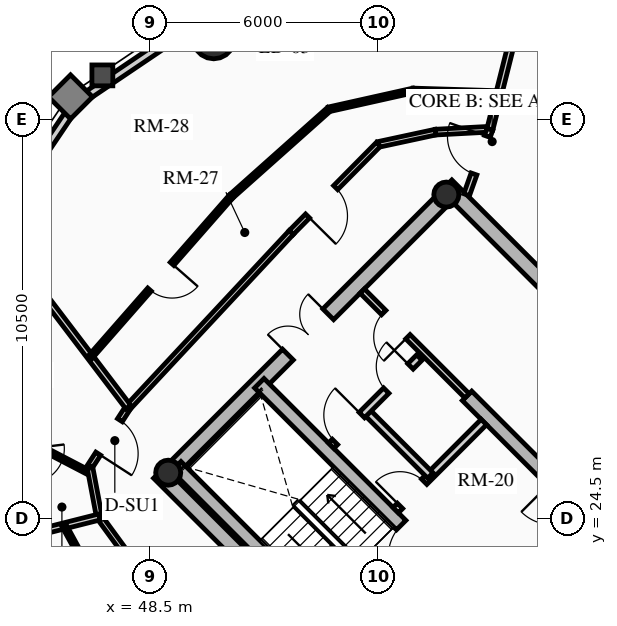
"""IFC4 building model, lengths in metres.
Left out: names, types, materials, properties, quantities, classifications, styles, units other than length and angle.
Written with IfcOpenShell. Run it as: python <this file> out.ifc"""

import sys

from ifc_helpers import new_model, si_unit, direction, frame, frame_2d, origin, origin_2d, place, context, subcontext, project, spatial, rectangle, circle, hollow_circle, extrude, source, transform, mapped, element, fill, save


model = new_model("IFC4")
c1 = context("Model", 3, precision=1e-05, world=origin(), true_north=direction((0.0, 1.0)))
c2 = subcontext(c1, "Body", "Model", "MODEL_VIEW")
j1 = project(units=[si_unit("LENGTHUNIT", "METRE"), si_unit("PLANEANGLEUNIT", "RADIAN")], contexts=[c1])
p1 = place(None, origin())
s1 = spatial("IfcSite", under=j1, at=p1, CompositionType="ELEMENT")
p2 = place(p1, origin())
s2 = spatial("IfcBuilding", under=s1, at=p2, CompositionType="ELEMENT")
p3 = place(p2, frame((0.0, 0.0, 214.12)))
s3 = spatial("IfcBuildingStorey", under=s2, at=p3, CompositionType="ELEMENT", Elevation=214.12)
for number, where, z_axis, x_axis in (
    (1, (58.702, 15.732, 0.0), (0.0, 0.0, 1.0), (-0.707, 0.707, 0.0)),
    (2, (66.268, 23.298, 0.0), (0.0, 0.0, 1.0), (-0.707, 0.707, 0.0)),
):
    element("IfcWall", number, at=place(p3, frame(where, z_axis=z_axis, x_axis=x_axis)), inside=s3, PredefinedType="SHEAR", context=c2, shape_type="SweptSolid", body=[
        extrude(rectangle(XDim=14.1, YDim=0.4, at=frame_2d((7.05, 0.0))), origin(), (0.0, 0.0, 1.0), 2.91),
    ])
p4 = place(p3, frame((48.873, 25.561, 0.0), z_axis=(0.0, 0.0, 1.0), x_axis=(0.707106781187, 0.707106781187, 0.0)))
e3 = element("IfcWall", 3, at=p4, inside=s3, PredefinedType="SHEAR", context=c2, shape_type="SweptSolid", body=[
    extrude(rectangle(XDim=10.7, YDim=0.4, at=frame_2d((5.35, 0.0))), origin(), (0.0, 0.0, 1.0), 2.91),
])
m1 = source(origin(), c2, "Body", "SweptSolid", [
    extrude(rectangle(XDim=1.5, YDim=2.02, at=frame_2d((0.75, 1.01))), frame((0.0, 0.21, 0.0), z_axis=(0.0, -1.0, 0.0), x_axis=(1.0, 0.0, 0.0)), (0.0, 0.0, 1.0), 0.42),
])
p5 = place(p4, frame((4.6, 0.0, 0.0)))
e4 = element("IfcOpeningElement", 4, at=p5, cuts=e3, PredefinedType="OPENING", context=c2, shape_type="MappedRepresentation", body=[
    mapped(m1, transform((0.0, 0.0, 0.0), x_axis=(1.0, 0.0, 0.0), y_axis=(0.0, 1.0, 0.0), z_axis=(0.0, 0.0, 1.0), scale=1.0)),
])
p6 = place(p3, frame((61.06, 18.373, 0.0), z_axis=(0.0, 0.0, 1.0), x_axis=(-0.707106781187, 0.707106781187, 0.0)))
e5 = element("IfcWall", 5, at=p6, inside=s3, PredefinedType="SHEAR", context=c2, shape_type="SweptSolid", body=[
    extrude(rectangle(XDim=13.7, YDim=0.35, at=frame_2d((6.85, 0.0))), origin(), (0.0, 0.0, 1.0), 2.91),
])
m2 = source(origin(), c2, "Body", "SweptSolid", [
    extrude(rectangle(XDim=1.1, YDim=2.015, at=frame_2d((0.55, 1.007))), frame((0.0, 0.185, 0.0), z_axis=(0.0, -1.0, 0.0), x_axis=(1.0, 0.0, 0.0)), (0.0, 0.0, 1.0), 0.37),
])
p7 = place(p6, frame((4.85, 0.0, 0.0)))
e6 = element("IfcOpeningElement", 6, at=p7, cuts=e5, PredefinedType="OPENING", context=c2, shape_type="MappedRepresentation", body=[
    mapped(m2, transform((0.0, 0.0, 0.0), x_axis=(1.0, 0.0, 0.0), y_axis=(0.0, 1.0, 0.0), z_axis=(0.0, 0.0, 1.0), scale=1.0)),
])
p8 = place(p6, frame((0.625, 0.0, 0.0)))
e7 = element("IfcOpeningElement", 7, at=p8, cuts=e5, PredefinedType="OPENING", context=c2, shape_type="MappedRepresentation", body=[
    mapped(m2, transform((0.0, 0.0, 0.0), x_axis=(1.0, 0.0, 0.0), y_axis=(0.0, 1.0, 0.0), z_axis=(0.0, 0.0, 1.0), scale=1.0)),
])
p9 = place(p6, frame((2.625, 0.0, 0.0)))
e8 = element("IfcOpeningElement", 8, at=p9, cuts=e5, PredefinedType="OPENING", context=c2, shape_type="MappedRepresentation", body=[
    mapped(m2, transform((0.0, 0.0, 0.0), x_axis=(1.0, 0.0, 0.0), y_axis=(0.0, 1.0, 0.0), z_axis=(0.0, 0.0, 1.0), scale=1.0)),
])
m3 = source(origin(), c2, "Body", "SweptSolid", [
    extrude(rectangle(XDim=1.15, YDim=2.02, at=frame_2d((0.575, 1.01))), frame((0.0, 0.185, 0.0), z_axis=(0.0, -1.0, 0.0), x_axis=(1.0, 0.0, 0.0)), (0.0, 0.0, 1.0), 0.37),
])
p10 = place(p6, frame((7.27, 0.0, 0.0)))
e9 = element("IfcOpeningElement", 9, at=p10, cuts=e5, PredefinedType="OPENING", context=c2, shape_type="MappedRepresentation", body=[
    mapped(m3, transform((0.0, 0.0, 0.0), x_axis=(1.0, 0.0, 0.0), y_axis=(0.0, 1.0, 0.0), z_axis=(0.0, 0.0, 1.0), scale=1.0)),
])
p11 = place(p3, frame((63.627, 20.94, 0.0), z_axis=(0.0, 0.0, 1.0), x_axis=(-0.707119496762, 0.707094065383, 0.0)))
e10 = element("IfcWall", 10, at=p11, inside=s3, PredefinedType="SHEAR", context=c2, shape_type="SweptSolid", body=[
    extrude(rectangle(XDim=9.6, YDim=0.35, at=frame_2d((4.8, 0.0))), origin(), (0.0, 0.0, 1.0), 2.91),
])
p12 = place(p11, frame((5.28, 0.0, 0.0)))
e11 = element("IfcOpeningElement", 11, at=p12, cuts=e10, PredefinedType="OPENING", context=c2, shape_type="MappedRepresentation", body=[
    mapped(m3, transform((0.0, 0.0, 0.0), x_axis=(1.0, 0.0, 0.0), y_axis=(0.0, 1.0, 0.0), z_axis=(0.0, 0.0, 1.0), scale=1.0)),
])
p13 = place(p3, frame((53.922, 21.141, 0.0), z_axis=(0.0, 0.0, 1.0), x_axis=(-0.707106781187, 0.707106781187, 0.0)))
e12 = element("IfcWall", 12, at=p13, inside=s3, PredefinedType="SHEAR", context=c2, shape_type="SweptSolid", body=[
    extrude(rectangle(XDim=6.695, YDim=0.35, at=frame_2d((3.348, 0.0))), origin(), (0.0, 0.0, 1.0), 2.91),
])
for number, where, z_axis, x_axis in (
    (13, (48.976, 25.706, 0.0), (0.0, 0.0, 1.0), (0.707, 0.707, 0.0)),
    (14, (56.294, 33.024, 0.0), (0.0, 0.0, 1.0), (0.707, 0.707, 0.0)),
):
    element("IfcColumn", number, at=place(p3, frame(where, z_axis=z_axis, x_axis=x_axis)), inside=s3, PredefinedType="COLUMN", context=c2, shape_type="SweptSolid", body=[
        extrude(hollow_circle(Radius=0.33, WallThickness=0.025, at=origin_2d()), origin(), (0.0, 0.0, 1.0), 2.91),
    ])
p14 = place(p3, frame((50.173, 37.146, 0.0), z_axis=(0.0, 0.0, 1.0), x_axis=(1.0, 0.0, 0.0)))
e15 = element("IfcColumn", 15, at=p14, inside=s3, PredefinedType="USERDEFINED", context=c2, shape_type="SweptSolid", body=[
    extrude(circle(Radius=0.55, at=origin_2d()), origin(), (0.0, 0.0, 1.0), 2.91),
])
p15 = place(p3, frame((46.561, 35.439, 0.0), z_axis=(0.0, 0.0, 1.0), x_axis=(0.828833723692, 0.559495003079, 0.0)))
e16 = element("IfcWall", 16, at=p15, inside=s3, PredefinedType="SOLIDWALL", context=c2, shape_type="SweptSolid", body=[
    extrude(rectangle(XDim=3.976, YDim=0.22, at=frame_2d((1.988, 0.0))), origin(), (0.0, 0.0, 1.0), 2.322),
])
p16 = place(p3, frame((44.337, 32.144, 0.0), z_axis=(0.0, 0.0, 1.0), x_axis=(0.559495003079, 0.828833723692, 0.0)))
e17 = element("IfcWall", 17, at=p16, inside=s3, PredefinedType="SOLIDWALL", context=c2, shape_type="SweptSolid", body=[
    extrude(rectangle(XDim=3.976, YDim=0.22, at=frame_2d((1.988, 0.0))), origin(), (0.0, 0.0, 1.0), 2.322),
])
m4 = source(origin(), c2, "Body", "SweptSolid", [
    extrude(rectangle(XDim=1.05, YDim=1.3, at=frame_2d((0.525, 0.65))), frame((0.0, 0.12, 0.0), z_axis=(0.0, -1.0, 0.0), x_axis=(1.0, 0.0, 0.0)), (0.0, 0.0, 1.0), 0.24),
])
p17 = place(p16, frame((1.463, 0.0, 0.65)))
e18 = element("IfcOpeningElement", 18, at=p17, cuts=e17, PredefinedType="OPENING", context=c2, shape_type="MappedRepresentation", body=[
    mapped(m4, transform((0.0, 0.0, 0.0), x_axis=(1.0, 0.0, 0.0), y_axis=(0.0, 1.0, 0.0), z_axis=(0.0, 0.0, 1.0), scale=1.0)),
])
p18 = place(p3, frame((58.214, 21.467, 0.0), z_axis=(0.0, 0.0, 1.0), x_axis=(0.707106781187, 0.707106781187, 0.0)))
e19 = element("IfcWall", 19, at=p18, inside=s3, PredefinedType="PARTITIONING", context=c2, shape_type="SweptSolid", body=[
    extrude(rectangle(XDim=3.28, YDim=0.2, at=frame_2d((1.64, 0.0))), origin(), (0.0, 0.0, 1.0), 2.685),
])
m5 = source(origin(), c2, "Body", "SweptSolid", [
    extrude(rectangle(XDim=1.5, YDim=2.02, at=frame_2d((0.75, 1.01))), frame((0.0, 0.11, 0.0), z_axis=(0.0, -1.0, 0.0), x_axis=(1.0, 0.0, 0.0)), (0.0, 0.0, 1.0), 0.22),
])
p19 = place(p18, frame((1.55, 0.0, 0.0)))
e20 = element("IfcOpeningElement", 20, at=p19, cuts=e19, PredefinedType="OPENING", context=c2, shape_type="MappedRepresentation", body=[
    mapped(m5, transform((0.0, 0.0, 0.0), x_axis=(1.0, 0.0, 0.0), y_axis=(0.0, 1.0, 0.0), z_axis=(0.0, 0.0, 1.0), scale=1.0)),
])
p20 = place(p3, frame((54.961, 24.719, 0.0), z_axis=(0.0, 0.0, 1.0), x_axis=(0.707106781187, 0.707106781187, 0.0)))
e21 = element("IfcWall", 21, at=p20, inside=s3, PredefinedType="PARTITIONING", context=c2, shape_type="SweptSolid", body=[
    extrude(rectangle(XDim=3.28, YDim=0.2, at=frame_2d((1.64, 0.0))), origin(), (0.0, 0.0, 1.0), 2.685),
])
m6 = source(origin(), c2, "Body", "SweptSolid", [
    extrude(rectangle(XDim=0.9, YDim=2.005, at=frame_2d((0.45, 1.002))), frame((0.0, 0.11, 0.0), z_axis=(0.0, -1.0, 0.0), x_axis=(1.0, 0.0, 0.0)), (0.0, 0.0, 1.0), 0.22),
])
p21 = place(p20, frame((0.16, 0.0, 0.0)))
e22 = element("IfcOpeningElement", 22, at=p21, cuts=e21, PredefinedType="OPENING", context=c2, shape_type="MappedRepresentation", body=[
    mapped(m6, transform((0.0, 0.0, 0.0), x_axis=(1.0, 0.0, 0.0), y_axis=(0.0, 1.0, 0.0), z_axis=(0.0, 0.0, 1.0), scale=1.0)),
])
p22 = place(p3, frame((55.874, 25.631, 0.0), z_axis=(0.0, 0.0, 1.0), x_axis=(-0.707157639372, 0.707055919343, 0.0)))
e23 = element("IfcWall", 23, at=p22, inside=s3, PredefinedType="PARTITIONING", context=c2, shape_type="SweptSolid", body=[
    extrude(rectangle(XDim=2.4, YDim=0.2, at=frame_2d((1.2, 0.0))), origin(), (0.0, 0.0, 1.0), 2.685),
])
p23 = place(p3, frame((53.264, 26.416, 0.0), z_axis=(0.0, 0.0, 1.0), x_axis=(0.707106781187, 0.707106781187, 0.0)))
e24 = element("IfcWall", 24, at=p23, inside=s3, PredefinedType="PARTITIONING", context=c2, shape_type="SweptSolid", body=[
    extrude(rectangle(XDim=3.28, YDim=0.2, at=frame_2d((1.64, 0.0))), origin(), (0.0, 0.0, 1.0), 2.685),
])
m7 = source(origin(), c2, "Body", "SweptSolid", [
    extrude(rectangle(XDim=1.0, YDim=2.015, at=frame_2d((0.5, 1.007))), frame((0.0, 0.11, 0.0), z_axis=(0.0, -1.0, 0.0), x_axis=(1.0, 0.0, 0.0)), (0.0, 0.0, 1.0), 0.22),
])
p24 = place(p23, frame((0.14, 0.0, 0.0)))
e25 = element("IfcOpeningElement", 25, at=p24, cuts=e24, PredefinedType="OPENING", context=c2, shape_type="MappedRepresentation", body=[
    mapped(m7, transform((0.0, 0.0, 0.0), x_axis=(1.0, 0.0, 0.0), y_axis=(0.0, 1.0, 0.0), z_axis=(0.0, 0.0, 1.0), scale=1.0)),
])
p25 = place(p23, frame((2.05, 0.0, 0.0)))
e26 = element("IfcOpeningElement", 26, at=p25, cuts=e24, PredefinedType="OPENING", context=c2, shape_type="MappedRepresentation", body=[
    mapped(m6, transform((0.0, 0.0, 0.0), x_axis=(1.0, 0.0, 0.0), y_axis=(0.0, 1.0, 0.0), z_axis=(0.0, 0.0, 1.0), scale=1.0)),
])
p26 = place(p3, frame((56.839, 27.728, 0.0), z_axis=(0.0, 0.0, 1.0), x_axis=(-0.707106781187, 0.707106781187, 0.0)))
e27 = element("IfcWall", 27, at=p26, inside=s3, PredefinedType="PARTITIONING", context=c2, shape_type="SweptSolid", body=[
    extrude(rectangle(XDim=3.9, YDim=0.16, at=frame_2d((1.95, 0.0))), origin(), (0.0, 0.0, 1.0), 2.685),
])
m8 = source(origin(), c2, "Body", "SweptSolid", [
    extrude(rectangle(XDim=0.9, YDim=2.005, at=frame_2d((0.45, 1.002))), frame((0.0, 0.09, 0.0), z_axis=(0.0, -1.0, 0.0), x_axis=(1.0, 0.0, 0.0)), (0.0, 0.0, 1.0), 0.18),
])
p27 = place(p26, frame((2.2, 0.0, 0.0)))
e28 = element("IfcOpeningElement", 28, at=p27, cuts=e27, PredefinedType="OPENING", context=c2, shape_type="MappedRepresentation", body=[
    mapped(m8, transform((0.0, 0.0, 0.0), x_axis=(1.0, 0.0, 0.0), y_axis=(0.0, 1.0, 0.0), z_axis=(0.0, 0.0, 1.0), scale=1.0)),
])
p28 = place(p3, frame((57.44, 34.744, 0.0), z_axis=(0.0, 0.0, 1.0), x_axis=(-0.998578025565, -0.053309725738, 0.0)))
e29 = element("IfcWall", 29, at=p28, inside=s3, PredefinedType="PARTITIONING", context=c2, shape_type="SweptSolid", body=[
    extrude(rectangle(XDim=1.433, YDim=0.15, at=frame_2d((0.717, 0.0))), origin(), (0.0, 0.0, 1.0), 2.322),
])
p29 = place(p3, frame((56.009, 34.667, 0.0), z_axis=(0.0, 0.0, 1.0), x_axis=(-0.977625498152, -0.210353001795, 0.0)))
e30 = element("IfcWall", 30, at=p29, inside=s3, PredefinedType="PARTITIONING", context=c2, shape_type="SweptSolid", body=[
    extrude(rectangle(XDim=1.538, YDim=0.15, at=frame_2d((0.769, 0.0))), origin(), (0.0, 0.0, 1.0), 2.255),
])
p30 = place(p3, frame((54.506, 34.344, 0.0), z_axis=(0.0, 0.0, 1.0), x_axis=(-0.703053402247, -0.711137056824, 0.0)))
e31 = element("IfcWall", 31, at=p30, inside=s3, PredefinedType="PARTITIONING", context=c2, shape_type="SweptSolid", body=[
    extrude(rectangle(XDim=3.262, YDim=0.15, at=frame_2d((1.631, 0.0))), origin(), (0.0, 0.0, 1.0), 2.322),
])
m9 = source(origin(), c2, "Body", "SweptSolid", [
    extrude(rectangle(XDim=1.05, YDim=2.015, at=frame_2d((0.525, 1.007))), frame((0.0, 0.085, 0.0), z_axis=(0.0, -1.0, 0.0), x_axis=(1.0, 0.0, 0.0)), (0.0, 0.0, 1.0), 0.17),
])
p31 = place(p30, frame((1.599, 0.0, 0.0)))
e32 = element("IfcOpeningElement", 32, at=p31, cuts=e31, PredefinedType="OPENING", context=c2, shape_type="MappedRepresentation", body=[
    mapped(m9, transform((0.0, 0.0, 0.0), x_axis=(1.0, 0.0, 0.0), y_axis=(0.0, 1.0, 0.0), z_axis=(0.0, 0.0, 1.0), scale=1.0)),
])
p32 = place(p3, frame((52.212, 32.024, 0.0), z_axis=(0.0, 0.0, 1.0), x_axis=(-0.682158998173, -0.731203871169, 0.0)))
e33 = element("IfcWall", 33, at=p32, inside=s3, PredefinedType="PARTITIONING", context=c2, shape_type="SweptSolid", body=[
    extrude(rectangle(XDim=6.282, YDim=0.15, at=frame_2d((3.141, 0.0))), origin(), (0.0, 0.0, 1.0), 2.255),
])
p33 = place(p3, frame((47.927, 27.431, 0.0), z_axis=(0.0, 0.0, 1.0), x_axis=(-0.543126643356, -0.839650790077, 0.0)))
e34 = element("IfcWall", 34, at=p33, inside=s3, PredefinedType="PARTITIONING", context=c2, shape_type="SweptSolid", body=[
    extrude(rectangle(XDim=1.868, YDim=0.15, at=frame_2d((0.934, 0.0))), origin(), (0.0, 0.0, 1.0), 2.255),
])
p34 = place(p33, frame((0.409, 0.0, 0.0)))
e35 = element("IfcOpeningElement", 35, at=p34, cuts=e34, PredefinedType="OPENING", context=c2, shape_type="MappedRepresentation", body=[
    mapped(m9, transform((0.0, 0.0, 0.0), x_axis=(1.0, 0.0, 0.0), y_axis=(0.0, 1.0, 0.0), z_axis=(0.0, 0.0, 1.0), scale=1.0)),
])
p35 = place(p3, frame((46.912, 25.862, 0.0), z_axis=(0.0, 0.0, 1.0), x_axis=(0.186095172215, -0.98253172309, 0.0)))
e36 = element("IfcWall", 36, at=p35, inside=s3, PredefinedType="PARTITIONING", context=c2, shape_type="SweptSolid", body=[
    extrude(rectangle(XDim=1.346, YDim=0.15, at=frame_2d((0.673, 0.0))), origin(), (0.0, 0.0, 1.0), 2.322),
])
p36 = place(p3, frame((47.163, 24.54, 0.0), z_axis=(0.0, 0.0, 1.0), x_axis=(0.589711902124, -0.807613690135, 0.0)))
e37 = element("IfcWall", 37, at=p36, inside=s3, PredefinedType="PARTITIONING", context=c2, shape_type="SweptSolid", body=[
    extrude(rectangle(XDim=1.507, YDim=0.15, at=frame_2d((0.753, 0.0))), origin(), (0.0, 0.0, 1.0), 2.255),
])
p37 = place(p3, frame((57.44, 34.744, 0.0), z_axis=(0.0, 0.0, 1.0), x_axis=(0.243619816457, 0.969870808422, 0.0)))
e38 = element("IfcWall", 38, at=p37, inside=s3, PredefinedType="PARTITIONING", context=c2, shape_type="SweptSolid", body=[
    extrude(rectangle(XDim=3.496, YDim=0.16, at=frame_2d((1.748, 0.0))), origin(), (0.0, 0.0, 1.0), 2.322),
])
p38 = place(p3, frame((47.927, 27.431, 0.0), z_axis=(0.0, 0.0, 1.0), x_axis=(-0.604823333103, 0.796359677366, 0.0)))
e39 = element("IfcWall", 39, at=p38, inside=s3, PredefinedType="PARTITIONING", context=c2, shape_type="SweptSolid", body=[
    extrude(rectangle(XDim=5.907, YDim=0.16, at=frame_2d((2.953, 0.0))), origin(), (0.0, 0.0, 1.0), 2.322),
])
p39 = place(p3, frame((47.163, 24.54, 0.0), z_axis=(0.0, 0.0, 1.0), x_axis=(-0.9696166611, -0.244629373781, 0.0)))
e40 = element("IfcWall", 40, at=p39, inside=s3, PredefinedType="PARTITIONING", context=c2, shape_type="SweptSolid", body=[
    extrude(rectangle(XDim=3.401, YDim=0.16, at=frame_2d((1.701, 0.0))), origin(), (0.0, 0.0, 1.0), 2.322),
])
p40 = place(p3, frame((56.828, 33.021, 0.0), z_axis=(0.0, 0.0, 1.0), x_axis=(0.334788446034, 0.942293317605, 0.0)))
e41 = element("IfcWall", 41, at=p40, inside=s3, PredefinedType="PARTITIONING", context=c2, shape_type="SweptSolid", body=[
    extrude(rectangle(XDim=1.829, YDim=0.16, at=frame_2d((0.915, 0.0))), origin(), (0.0, 0.0, 1.0), 2.255),
])
m10 = source(origin(), c2, "Body", "SweptSolid", [
    extrude(rectangle(XDim=1.05, YDim=2.015, at=frame_2d((0.525, 1.007))), frame((0.0, 0.09, 0.0), z_axis=(0.0, -1.0, 0.0), x_axis=(1.0, 0.0, 0.0)), (0.0, 0.0, 1.0), 0.18),
])
p41 = place(p40, frame((0.579, 0.0, 0.0)))
e42 = element("IfcOpeningElement", 42, at=p41, cuts=e41, PredefinedType="OPENING", context=c2, shape_type="MappedRepresentation", body=[
    mapped(m10, transform((0.0, 0.0, 0.0), x_axis=(1.0, 0.0, 0.0), y_axis=(0.0, 1.0, 0.0), z_axis=(0.0, 0.0, 1.0), scale=1.0)),
])
p42 = place(p3, frame((57.679, 35.693, 0.0), z_axis=(0.0, 0.0, 1.0), x_axis=(-0.999526298938, 0.030776252722, 0.0)))
e43 = element("IfcWall", 43, at=p42, inside=s3, PredefinedType="PARTITIONING", context=c2, shape_type="SweptSolid", body=[
    extrude(rectangle(XDim=2.261, YDim=0.125, at=frame_2d((1.13, 0.0))), origin(), (0.0, 0.0, 1.0), 2.322),
])
p43 = place(p3, frame((55.419, 35.763, 0.0), z_axis=(0.0, 0.0, 1.0), x_axis=(-0.975917771425, -0.218138725166, 0.0)))
e44 = element("IfcWall", 44, at=p43, inside=s3, PredefinedType="PARTITIONING", context=c2, shape_type="SweptSolid", body=[
    extrude(rectangle(XDim=2.268, YDim=0.125, at=frame_2d((1.134, 0.0))), origin(), (0.0, 0.0, 1.0), 2.255),
])
p44 = place(p3, frame((53.206, 35.268, 0.0), z_axis=(0.0, 0.0, 1.0), x_axis=(-0.746677760999, -0.665185929819, 0.0)))
e45 = element("IfcWall", 45, at=p44, inside=s3, PredefinedType="PARTITIONING", context=c2, shape_type="SweptSolid", body=[
    extrude(rectangle(XDim=3.445, YDim=0.125, at=frame_2d((1.723, 0.0))), origin(), (0.0, 0.0, 1.0), 2.322),
])
p45 = place(p3, frame((50.634, 32.977, 0.0), z_axis=(0.0, 0.0, 1.0), x_axis=(-0.659241945747, -0.751930885765, 0.0)))
e46 = element("IfcWall", 46, at=p45, inside=s3, PredefinedType="PARTITIONING", context=c2, shape_type="SweptSolid", body=[
    extrude(rectangle(XDim=5.624, YDim=0.125, at=frame_2d((2.812, 0.0))), origin(), (0.0, 0.0, 1.0), 2.255),
])
m11 = source(origin(), c2, "Body", "SweptSolid", [
    extrude(rectangle(XDim=0.9, YDim=2.005, at=frame_2d((0.45, 1.002))), frame((0.0, 0.073, 0.0), z_axis=(0.0, -1.0, 0.0), x_axis=(1.0, 0.0, 0.0)), (0.0, 0.0, 1.0), 0.145),
])
p46 = place(p45, frame((2.362, 0.0, 0.0)))
e47 = element("IfcOpeningElement", 47, at=p46, cuts=e46, PredefinedType="OPENING", context=c2, shape_type="MappedRepresentation", body=[
    mapped(m11, transform((0.0, 0.0, 0.0), x_axis=(1.0, 0.0, 0.0), y_axis=(0.0, 1.0, 0.0), z_axis=(0.0, 0.0, 1.0), scale=1.0)),
])
p47 = place(p3, frame((46.844, 25.731, 0.0), z_axis=(0.0, 0.0, 1.0), x_axis=(-0.886802533251, 0.462148533504, 0.0)))
e48 = element("IfcWall", 48, at=p47, inside=s3, PredefinedType="PARTITIONING", context=c2, shape_type="SweptSolid", body=[
    extrude(rectangle(XDim=1.719, YDim=0.125, at=frame_2d((0.859, 0.0))), origin(), (0.0, 0.0, 1.0), 2.685),
])
p48 = place(p3, frame((46.24, 24.307, 0.0), z_axis=(0.0, 0.0, 1.0), x_axis=(0.479212341296, -0.87769899849, 0.0)))
e49 = element("IfcWall", 49, at=p48, inside=s3, PredefinedType="PARTITIONING", context=c2, shape_type="SweptSolid", body=[
    extrude(rectangle(XDim=2.374, YDim=0.125, at=frame_2d((1.187, 0.0))), origin(), (0.0, 0.0, 1.0), 2.255),
])
m12 = source(origin(), c2, "Body", "SweptSolid", [
    extrude(rectangle(XDim=1.15, YDim=2.02, at=frame_2d((0.575, 1.01))), frame((0.0, 0.025, 0.0), z_axis=(0.0, -1.0, 0.0), x_axis=(1.0, 0.0, 0.0)), (0.0, 0.0, 1.0), 0.05),
])
p49 = place(p10, origin())
e50 = element("IfcDoor", 50, at=p49, inside=s3, OperationType="SINGLE_SWING_LEFT", PredefinedType="DOOR", context=c2, shape_type="MappedRepresentation", body=[
    mapped(m12, transform((0.0, 0.0, 0.0), x_axis=(1.0, 0.0, 0.0), y_axis=(0.0, 1.0, 0.0), z_axis=(0.0, 0.0, 1.0), scale=1.0)),
])
fill(e9, e50)
m13 = source(origin(), c2, "Body", "SweptSolid", [
    extrude(rectangle(XDim=1.5, YDim=2.02, at=frame_2d((0.75, 1.01))), frame((0.0, 0.025, 0.0), z_axis=(0.0, -1.0, 0.0), x_axis=(1.0, 0.0, 0.0)), (0.0, 0.0, 1.0), 0.05),
])
p50 = place(p5, origin())
e51 = element("IfcDoor", 51, at=p50, inside=s3, OperationType="DOUBLE_DOOR_SINGLE_SWING", PredefinedType="DOOR", context=c2, shape_type="MappedRepresentation", body=[
    mapped(m13, transform((0.0, 0.0, 0.0), x_axis=(1.0, 0.0, 0.0), y_axis=(0.0, 1.0, 0.0), z_axis=(0.0, 0.0, 1.0), scale=1.0)),
])
fill(e4, e51)
m14 = source(origin(), c2, "Body", "SweptSolid", [
    extrude(rectangle(XDim=0.9, YDim=2.005, at=frame_2d((0.45, 1.002))), frame((0.0, 0.025, 0.0), z_axis=(0.0, -1.0, 0.0), x_axis=(1.0, 0.0, 0.0)), (0.0, 0.0, 1.0), 0.05),
])
p51 = place(p21, origin())
e52 = element("IfcDoor", 52, at=p51, inside=s3, OperationType="SINGLE_SWING_LEFT", PredefinedType="DOOR", context=c2, shape_type="MappedRepresentation", body=[
    mapped(m14, transform((0.0, 0.0, 0.0), x_axis=(1.0, 0.0, 0.0), y_axis=(0.0, 1.0, 0.0), z_axis=(0.0, 0.0, 1.0), scale=1.0)),
])
fill(e22, e52)
m15 = source(origin(), c2, "Body", "SweptSolid", [
    extrude(rectangle(XDim=1.0, YDim=2.015, at=frame_2d((0.5, 1.007))), frame((0.0, 0.025, 0.0), z_axis=(0.0, -1.0, 0.0), x_axis=(1.0, 0.0, 0.0)), (0.0, 0.0, 1.0), 0.05),
])
p52 = place(p24, origin())
e53 = element("IfcDoor", 53, at=p52, inside=s3, OperationType="SINGLE_SWING_RIGHT", PredefinedType="DOOR", context=c2, shape_type="MappedRepresentation", body=[
    mapped(m15, transform((0.0, 0.0, 0.0), x_axis=(1.0, 0.0, 0.0), y_axis=(0.0, 1.0, 0.0), z_axis=(0.0, 0.0, 1.0), scale=1.0)),
])
fill(e25, e53)
p53 = place(p25, origin())
e54 = element("IfcDoor", 54, at=p53, inside=s3, OperationType="SINGLE_SWING_RIGHT", PredefinedType="DOOR", context=c2, shape_type="MappedRepresentation", body=[
    mapped(m14, transform((0.0, 0.0, 0.0), x_axis=(1.0, 0.0, 0.0), y_axis=(0.0, 1.0, 0.0), z_axis=(0.0, 0.0, 1.0), scale=1.0)),
])
fill(e26, e54)
p54 = place(p27, origin())
e55 = element("IfcDoor", 55, at=p54, inside=s3, OperationType="SINGLE_SWING_LEFT", PredefinedType="DOOR", context=c2, shape_type="MappedRepresentation", body=[
    mapped(m14, transform((0.0, 0.0, 0.0), x_axis=(1.0, 0.0, 0.0), y_axis=(0.0, 1.0, 0.0), z_axis=(0.0, 0.0, 1.0), scale=1.0)),
])
fill(e28, e55)
m16 = source(origin(), c2, "Body", "SweptSolid", [
    extrude(rectangle(XDim=1.05, YDim=2.015, at=frame_2d((0.525, 1.007))), frame((0.0, 0.025, 0.0), z_axis=(0.0, -1.0, 0.0), x_axis=(1.0, 0.0, 0.0)), (0.0, 0.0, 1.0), 0.05),
])
p55 = place(p41, origin())
e56 = element("IfcDoor", 56, at=p55, inside=s3, OperationType="SINGLE_SWING_RIGHT", PredefinedType="DOOR", context=c2, shape_type="MappedRepresentation", body=[
    mapped(m16, transform((0.0, 0.0, 0.0), x_axis=(1.0, 0.0, 0.0), y_axis=(0.0, 1.0, 0.0), z_axis=(0.0, 0.0, 1.0), scale=1.0)),
])
fill(e42, e56)
p56 = place(p31, origin())
e57 = element("IfcDoor", 57, at=p56, inside=s3, OperationType="SINGLE_SWING_RIGHT", PredefinedType="DOOR", context=c2, shape_type="MappedRepresentation", body=[
    mapped(m16, transform((0.0, 0.0, 0.0), x_axis=(1.0, 0.0, 0.0), y_axis=(0.0, 1.0, 0.0), z_axis=(0.0, 0.0, 1.0), scale=1.0)),
])
fill(e32, e57)
p57 = place(p46, origin())
e58 = element("IfcDoor", 58, at=p57, inside=s3, OperationType="SINGLE_SWING_LEFT", PredefinedType="DOOR", context=c2, shape_type="MappedRepresentation", body=[
    mapped(m14, transform((0.0, 0.0, 0.0), x_axis=(1.0, 0.0, 0.0), y_axis=(0.0, 1.0, 0.0), z_axis=(0.0, 0.0, 1.0), scale=1.0)),
])
fill(e47, e58)
p58 = place(p34, origin())
e59 = element("IfcDoor", 59, at=p58, inside=s3, OperationType="SINGLE_SWING_RIGHT", PredefinedType="DOOR", context=c2, shape_type="MappedRepresentation", body=[
    mapped(m16, transform((0.0, 0.0, 0.0), x_axis=(1.0, 0.0, 0.0), y_axis=(0.0, 1.0, 0.0), z_axis=(0.0, 0.0, 1.0), scale=1.0)),
])
fill(e35, e59)
save(model, sys.argv[1])
